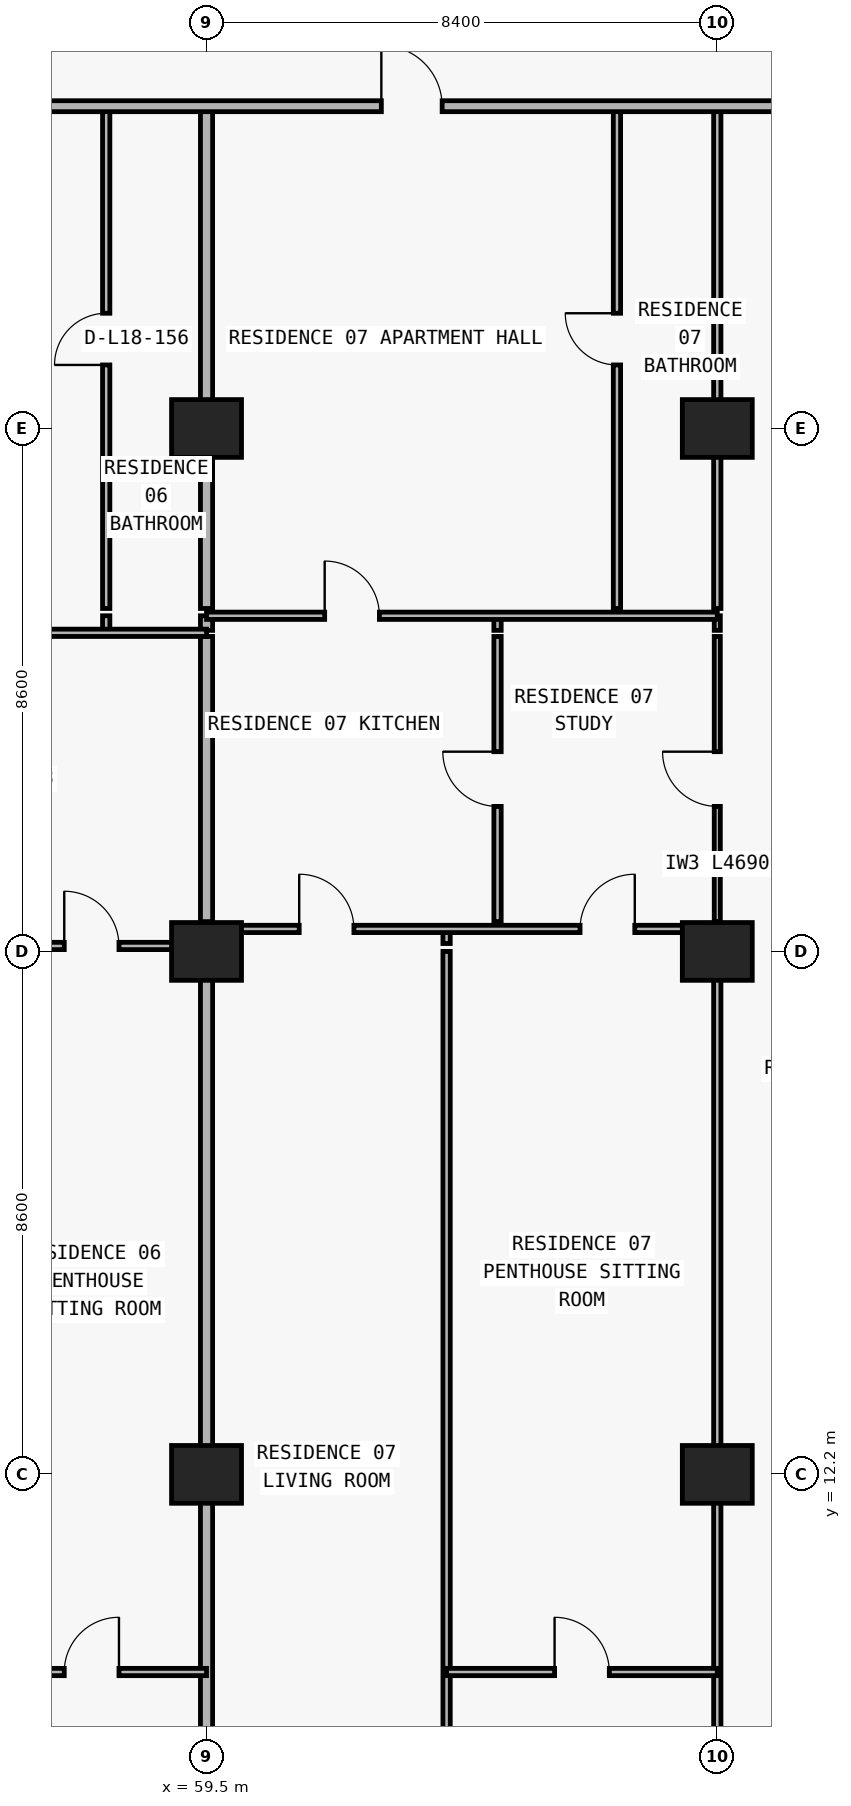
"""IFC4 building model, lengths in metres.
Left out: names, types, materials, properties, quantities, classifications, styles, units other than length and angle.
Written with IfcOpenShell. Run it as: python <this file> out.ifc"""

import sys

from ifc_helpers import new_model, si_unit, direction, frame, frame_2d, origin, origin_2d, place, context, subcontext, project, spatial, rectangle, extrude, element, fill, save


model = new_model("IFC4")
c1 = context("Model", 3, precision=1e-05, world=origin(), true_north=direction((0.0, 1.0)))
c2 = subcontext(c1, "Body", "Model", "MODEL_VIEW")
j1 = project(units=[si_unit("LENGTHUNIT", "METRE"), si_unit("PLANEANGLEUNIT", "RADIAN")], contexts=[c1])
p1 = place(None, origin())
s1 = spatial("IfcSite", under=j1, at=p1, CompositionType="ELEMENT")
p2 = place(p1, origin())
s2 = spatial("IfcBuilding", under=s1, at=p2, CompositionType="ELEMENT")
p3 = place(p2, frame((0.0, 0.0, 69.6)))
s3 = spatial("IfcBuildingStorey", under=s2, at=p3, CompositionType="ELEMENT", Elevation=69.6)
for number, where, z_axis, x_axis in (
    (1, (59.5, 12.2, 0.0), (0.0, 0.0, 1.0), (1.0, 0.0, 0.0)),
    (2, (67.9, 12.2, 0.0), (0.0, 0.0, 1.0), (1.0, 0.0, 0.0)),
    (3, (59.5, 20.8, 0.0), (0.0, 0.0, 1.0), (1.0, 0.0, 0.0)),
    (4, (67.9, 20.8, 0.0), (0.0, 0.0, 1.0), (1.0, 0.0, 0.0)),
    (5, (59.5, 29.4, 0.0), (0.0, 0.0, 1.0), (1.0, 0.0, 0.0)),
    (6, (67.9, 29.4, 0.0), (0.0, 0.0, 1.0), (1.0, 0.0, 0.0)),
):
    element("IfcColumn", number, at=place(p3, frame(where, z_axis=z_axis, x_axis=x_axis)), inside=s3, PredefinedType="COLUMN", context=c2, shape_type="SweptSolid", body=[
        extrude(rectangle(XDim=1.15, YDim=0.95, at=origin_2d()), origin(), (0.0, 0.0, 1.0), 3.05),
    ])
p4 = place(p3, frame((57.85, 26.08, 0.0), z_axis=(0.0, 0.0, 1.0), x_axis=(0.0, 1.0, 0.0)))
e7 = element("IfcWall", 7, at=p4, inside=s3, PredefinedType="PARTITIONING", context=c2, shape_type="SweptSolid", body=[
    extrude(rectangle(XDim=0.24, YDim=0.12, at=frame_2d((0.12, 0.0))), origin(), (0.0, 0.0, 1.0), 3.05),
])
p5 = place(p3, frame((57.85, 26.44, 0.0), z_axis=(0.0, 0.0, 1.0), x_axis=(0.0, 1.0, 0.0)))
e8 = element("IfcWall", 8, at=p5, inside=s3, PredefinedType="PARTITIONING", context=c2, shape_type="SweptSolid", body=[
    extrude(rectangle(XDim=8.26, YDim=0.12, at=frame_2d((4.13, 0.0))), origin(), (0.0, 0.0, 1.0), 3.05),
])
p6 = place(p5, frame((4.005, 0.0, 0.0)))
e9 = element("IfcOpeningElement", 9, at=p6, cuts=e8, PredefinedType="OPENING", context=c2, shape_type="SweptSolid", body=[
    extrude(rectangle(XDim=0.85, YDim=2.1, at=frame_2d((0.425, 1.05))), frame((0.0, 0.07, 0.0), z_axis=(0.0, -1.0, 0.0), x_axis=(1.0, 0.0, 0.0)), (0.0, 0.0, 1.0), 0.14),
])
p7 = place(p3, frame((59.5, 6.24, 0.0), z_axis=(0.0, 0.0, 1.0), x_axis=(0.0, 1.0, 0.0)))
e10 = element("IfcWall", 10, at=p7, inside=s3, PredefinedType="PARTITIONING", context=c2, shape_type="SweptSolid", body=[
    extrude(rectangle(XDim=14.56, YDim=0.2, at=frame_2d((7.28, 0.0))), origin(), (0.0, 0.0, 1.0), 2.11),
])
p8 = place(p3, frame((59.5, 20.93, 0.0), z_axis=(0.0, 0.0, 1.0), x_axis=(0.0, 1.0, 0.0)))
e11 = element("IfcWall", 11, at=p8, inside=s3, PredefinedType="PARTITIONING", context=c2, shape_type="SweptSolid", body=[
    extrude(rectangle(XDim=0.24, YDim=0.2, at=frame_2d((0.12, 0.0))), origin(), (0.0, 0.0, 1.0), 3.05),
])
p9 = place(p3, frame((59.5, 21.29, 0.0), z_axis=(0.0, 0.0, 1.0), x_axis=(0.0, 1.0, 0.0)))
e12 = element("IfcWall", 12, at=p9, inside=s3, PredefinedType="PARTITIONING", context=c2, shape_type="SweptSolid", body=[
    extrude(rectangle(XDim=4.69, YDim=0.2, at=frame_2d((2.345, 0.0))), origin(), (0.0, 0.0, 1.0), 2.11),
])
p10 = place(p3, frame((59.5, 26.08, 0.0), z_axis=(0.0, 0.0, 1.0), x_axis=(0.0, 1.0, 0.0)))
e13 = element("IfcWall", 13, at=p10, inside=s3, PredefinedType="PARTITIONING", context=c2, shape_type="SweptSolid", body=[
    extrude(rectangle(XDim=0.24, YDim=0.2, at=frame_2d((0.12, 0.0))), origin(), (0.0, 0.0, 1.0), 2.11),
])
p11 = place(p3, frame((59.5, 26.44, 0.0), z_axis=(0.0, 0.0, 1.0), x_axis=(0.0, 1.0, 0.0)))
e14 = element("IfcWall", 14, at=p11, inside=s3, PredefinedType="PARTITIONING", context=c2, shape_type="SweptSolid", body=[
    extrude(rectangle(XDim=8.26, YDim=0.2, at=frame_2d((4.13, 0.0))), origin(), (0.0, 0.0, 1.0), 2.11),
])
p12 = place(p3, frame((63.448, 6.24, 0.0), z_axis=(0.0, 0.0, 1.0), x_axis=(0.0, 1.0, 0.0)))
e15 = element("IfcWall", 15, at=p12, inside=s3, PredefinedType="PARTITIONING", context=c2, shape_type="SweptSolid", body=[
    extrude(rectangle(XDim=14.56, YDim=0.12, at=frame_2d((7.28, 0.0))), origin(), (0.0, 0.0, 1.0), 3.05),
])
p13 = place(p3, frame((63.448, 20.93, 0.0), z_axis=(0.0, 0.0, 1.0), x_axis=(0.0, 1.0, 0.0)))
e16 = element("IfcWall", 16, at=p13, inside=s3, PredefinedType="PARTITIONING", context=c2, shape_type="SweptSolid", body=[
    extrude(rectangle(XDim=0.24, YDim=0.12, at=frame_2d((0.12, 0.0))), origin(), (0.0, 0.0, 1.0), 3.05),
])
p14 = place(p3, frame((64.286, 21.29, 0.0), z_axis=(0.0, 0.0, 1.0), x_axis=(0.0, 1.0, 0.0)))
e17 = element("IfcWall", 17, at=p14, inside=s3, PredefinedType="PARTITIONING", context=c2, shape_type="SweptSolid", body=[
    extrude(rectangle(XDim=4.69, YDim=0.12, at=frame_2d((2.345, 0.0))), origin(), (0.0, 0.0, 1.0), 3.05),
])
p15 = place(p14, frame((1.895, 0.0, 0.0)))
e18 = element("IfcOpeningElement", 18, at=p15, cuts=e17, PredefinedType="OPENING", context=c2, shape_type="SweptSolid", body=[
    extrude(rectangle(XDim=0.9, YDim=2.15, at=frame_2d((0.45, 1.075))), frame((0.0, 0.07, 0.0), z_axis=(0.0, -1.0, 0.0), x_axis=(1.0, 0.0, 0.0)), (0.0, 0.0, 1.0), 0.14),
])
p16 = place(p3, frame((64.286, 26.08, 0.0), z_axis=(0.0, 0.0, 1.0), x_axis=(0.0, 1.0, 0.0)))
e19 = element("IfcWall", 19, at=p16, inside=s3, PredefinedType="PARTITIONING", context=c2, shape_type="SweptSolid", body=[
    extrude(rectangle(XDim=0.24, YDim=0.12, at=frame_2d((0.12, 0.0))), origin(), (0.0, 0.0, 1.0), 3.05),
])
p17 = place(p3, frame((66.25, 26.44, 0.0), z_axis=(0.0, 0.0, 1.0), x_axis=(0.0, 1.0, 0.0)))
e20 = element("IfcWall", 20, at=p17, inside=s3, PredefinedType="PARTITIONING", context=c2, shape_type="SweptSolid", body=[
    extrude(rectangle(XDim=8.26, YDim=0.12, at=frame_2d((4.13, 0.0))), origin(), (0.0, 0.0, 1.0), 3.05),
])
p18 = place(p17, frame((4.005, 0.0, 0.0)))
e21 = element("IfcOpeningElement", 21, at=p18, cuts=e20, PredefinedType="OPENING", context=c2, shape_type="SweptSolid", body=[
    extrude(rectangle(XDim=0.85, YDim=2.1, at=frame_2d((0.425, 1.05))), frame((0.0, 0.07, 0.0), z_axis=(0.0, -1.0, 0.0), x_axis=(1.0, 0.0, 0.0)), (0.0, 0.0, 1.0), 0.14),
])
p19 = place(p3, frame((67.9, 6.24, 0.0), z_axis=(0.0, 0.0, 1.0), x_axis=(0.0, 1.0, 0.0)))
e22 = element("IfcWall", 22, at=p19, inside=s3, PredefinedType="PARTITIONING", context=c2, shape_type="SweptSolid", body=[
    extrude(rectangle(XDim=14.56, YDim=0.12, at=frame_2d((7.28, 0.0))), origin(), (0.0, 0.0, 1.0), 2.11),
])
p20 = place(p3, frame((67.9, 20.93, 0.0), z_axis=(0.0, 0.0, 1.0), x_axis=(0.0, 1.0, 0.0)))
e23 = element("IfcWall", 23, at=p20, inside=s3, PredefinedType="PARTITIONING", context=c2, shape_type="SweptSolid", body=[
    extrude(rectangle(XDim=0.24, YDim=0.12, at=frame_2d((0.12, 0.0))), origin(), (0.0, 0.0, 1.0), 3.05),
])
p21 = place(p3, frame((67.9, 21.29, 0.0), z_axis=(0.0, 0.0, 1.0), x_axis=(0.0, 1.0, 0.0)))
e24 = element("IfcWall", 24, at=p21, inside=s3, PredefinedType="MOVABLE", context=c2, shape_type="SweptSolid", body=[
    extrude(rectangle(XDim=4.69, YDim=0.1, at=frame_2d((2.345, 0.0))), origin(), (0.0, 0.0, 1.0), 2.11),
])
p22 = place(p21, frame((1.895, 0.0, 0.0)))
e25 = element("IfcOpeningElement", 25, at=p22, cuts=e24, PredefinedType="OPENING", context=c2, shape_type="SweptSolid", body=[
    extrude(rectangle(XDim=0.9, YDim=2.06, at=frame_2d((0.45, 1.03))), frame((0.0, 0.06, 0.0), z_axis=(0.0, -1.0, 0.0), x_axis=(1.0, 0.0, 0.0)), (0.0, 0.0, 1.0), 0.12),
])
p23 = place(p3, frame((67.9, 26.08, 0.0), z_axis=(0.0, 0.0, 1.0), x_axis=(0.0, 1.0, 0.0)))
e26 = element("IfcWall", 26, at=p23, inside=s3, PredefinedType="MOVABLE", context=c2, shape_type="SweptSolid", body=[
    extrude(rectangle(XDim=0.24, YDim=0.1, at=frame_2d((0.12, 0.0))), origin(), (0.0, 0.0, 1.0), 2.11),
])
p24 = place(p3, frame((67.9, 26.44, 0.0), z_axis=(0.0, 0.0, 1.0), x_axis=(0.0, 1.0, 0.0)))
e27 = element("IfcWall", 27, at=p24, inside=s3, PredefinedType="PARTITIONING", context=c2, shape_type="SweptSolid", body=[
    extrude(rectangle(XDim=8.26, YDim=0.12, at=frame_2d((4.13, 0.0))), origin(), (0.0, 0.0, 1.0), 2.11),
])
p25 = place(p3, frame((55.72, 8.95, 0.0), z_axis=(0.0, 0.0, 1.0), x_axis=(1.0, 0.0, 0.0)))
e28 = element("IfcWall", 28, at=p25, inside=s3, PredefinedType="PARTITIONING", context=c2, shape_type="SweptSolid", body=[
    extrude(rectangle(XDim=3.78, YDim=0.12, at=frame_2d((1.89, 0.0))), origin(), (0.0, 0.0, 1.0), 3.05),
])
p26 = place(p25, frame((1.44, 0.0, 0.0)))
e29 = element("IfcOpeningElement", 29, at=p26, cuts=e28, PredefinedType="OPENING", context=c2, shape_type="SweptSolid", body=[
    extrude(rectangle(XDim=0.9, YDim=2.15, at=frame_2d((0.45, 1.075))), frame((0.0, 0.07, 0.0), z_axis=(0.0, -1.0, 0.0), x_axis=(1.0, 0.0, 0.0)), (0.0, 0.0, 1.0), 0.14),
])
p27 = place(p3, frame((63.448, 8.95, 0.0), z_axis=(0.0, 0.0, 1.0), x_axis=(1.0, 0.0, 0.0)))
e30 = element("IfcWall", 30, at=p27, inside=s3, PredefinedType="PARTITIONING", context=c2, shape_type="SweptSolid", body=[
    extrude(rectangle(XDim=4.452, YDim=0.12, at=frame_2d((2.226, 0.0))), origin(), (0.0, 0.0, 1.0), 3.05),
])
p28 = place(p27, frame((1.776, 0.0, 0.0)))
e31 = element("IfcOpeningElement", 31, at=p28, cuts=e30, PredefinedType="OPENING", context=c2, shape_type="SweptSolid", body=[
    extrude(rectangle(XDim=0.9, YDim=2.15, at=frame_2d((0.45, 1.075))), frame((0.0, 0.07, 0.0), z_axis=(0.0, -1.0, 0.0), x_axis=(1.0, 0.0, 0.0)), (0.0, 0.0, 1.0), 0.14),
])
p29 = place(p3, frame((51.37, 20.89, 0.0), z_axis=(0.0, 0.0, 1.0), x_axis=(1.0, 0.0, 0.0)))
e32 = element("IfcWall", 32, at=p29, inside=s3, PredefinedType="PARTITIONING", context=c2, shape_type="SweptSolid", body=[
    extrude(rectangle(XDim=8.13, YDim=0.12, at=frame_2d((4.065, 0.0))), origin(), (0.0, 0.0, 1.0), 2.11),
])
p30 = place(p29, frame((1.683, 0.0, 0.0)))
e33 = element("IfcOpeningElement", 33, at=p30, cuts=e32, PredefinedType="OPENING", context=c2, shape_type="SweptSolid", body=[
    extrude(rectangle(XDim=0.9, YDim=2.06, at=frame_2d((0.45, 1.03))), frame((0.0, 0.07, 0.0), z_axis=(0.0, -1.0, 0.0), x_axis=(1.0, 0.0, 0.0)), (0.0, 0.0, 1.0), 0.14),
])
p31 = place(p29, frame((5.79, 0.0, 0.0)))
e34 = element("IfcOpeningElement", 34, at=p31, cuts=e32, PredefinedType="OPENING", context=c2, shape_type="SweptSolid", body=[
    extrude(rectangle(XDim=0.9, YDim=2.06, at=frame_2d((0.45, 1.03))), frame((0.0, 0.07, 0.0), z_axis=(0.0, -1.0, 0.0), x_axis=(1.0, 0.0, 0.0)), (0.0, 0.0, 1.0), 0.14),
])
p32 = place(p3, frame((59.5, 21.17, 0.0), z_axis=(0.0, 0.0, 1.0), x_axis=(1.0, 0.0, 0.0)))
e35 = element("IfcWall", 35, at=p32, inside=s3, PredefinedType="PARTITIONING", context=c2, shape_type="SweptSolid", body=[
    extrude(rectangle(XDim=8.4, YDim=0.12, at=frame_2d((4.2, 0.0))), origin(), (0.0, 0.0, 1.0), 3.05),
])
p33 = place(p32, frame((1.524, 0.0, 0.0)))
e36 = element("IfcOpeningElement", 36, at=p33, cuts=e35, PredefinedType="OPENING", context=c2, shape_type="SweptSolid", body=[
    extrude(rectangle(XDim=0.9, YDim=2.15, at=frame_2d((0.45, 1.075))), frame((0.0, 0.07, 0.0), z_axis=(0.0, -1.0, 0.0), x_axis=(1.0, 0.0, 0.0)), (0.0, 0.0, 1.0), 0.14),
])
p34 = place(p32, frame((6.143, 0.0, 0.0)))
e37 = element("IfcOpeningElement", 37, at=p34, cuts=e35, PredefinedType="OPENING", context=c2, shape_type="SweptSolid", body=[
    extrude(rectangle(XDim=0.9, YDim=2.15, at=frame_2d((0.45, 1.075))), frame((0.0, 0.07, 0.0), z_axis=(0.0, -1.0, 0.0), x_axis=(1.0, 0.0, 0.0)), (0.0, 0.0, 1.0), 0.14),
])
p35 = place(p3, frame((51.37, 26.04, 0.0), z_axis=(0.0, 0.0, 1.0), x_axis=(1.0, 0.0, 0.0)))
e38 = element("IfcWall", 38, at=p35, inside=s3, PredefinedType="PARTITIONING", context=c2, shape_type="SweptSolid", body=[
    extrude(rectangle(XDim=8.13, YDim=0.12, at=frame_2d((4.065, 0.0))), origin(), (0.0, 0.0, 1.0), 3.05),
])
p36 = place(p35, frame((1.683, 0.0, 0.0)))
e39 = element("IfcOpeningElement", 39, at=p36, cuts=e38, PredefinedType="OPENING", context=c2, shape_type="SweptSolid", body=[
    extrude(rectangle(XDim=0.9, YDim=2.15, at=frame_2d((0.45, 1.075))), frame((0.0, 0.07, 0.0), z_axis=(0.0, -1.0, 0.0), x_axis=(1.0, 0.0, 0.0)), (0.0, 0.0, 1.0), 0.14),
])
p37 = place(p3, frame((59.5, 26.32, 0.0), z_axis=(0.0, 0.0, 1.0), x_axis=(1.0, 0.0, 0.0)))
e40 = element("IfcWall", 40, at=p37, inside=s3, PredefinedType="PARTITIONING", context=c2, shape_type="SweptSolid", body=[
    extrude(rectangle(XDim=8.4, YDim=0.12, at=frame_2d((4.2, 0.0))), origin(), (0.0, 0.0, 1.0), 3.05),
])
p38 = place(p37, frame((1.943, 0.0, 0.0)))
e41 = element("IfcOpeningElement", 41, at=p38, cuts=e40, PredefinedType="OPENING", context=c2, shape_type="SweptSolid", body=[
    extrude(rectangle(XDim=0.9, YDim=2.15, at=frame_2d((0.45, 1.075))), frame((0.0, 0.07, 0.0), z_axis=(0.0, -1.0, 0.0), x_axis=(1.0, 0.0, 0.0)), (0.0, 0.0, 1.0), 0.14),
])
p39 = place(p3, frame((5.105, 34.7, 0.0), z_axis=(0.0, 0.0, 1.0), x_axis=(1.0, 0.0, 0.0)))
e42 = element("IfcWall", 42, at=p39, inside=s3, PredefinedType="PARTITIONING", context=c2, shape_type="SweptSolid", body=[
    extrude(rectangle(XDim=67.595, YDim=0.18, at=frame_2d((33.797, 0.0))), origin(), (0.0, 0.0, 1.0), 3.05),
])
p40 = place(p39, frame((7.67, 0.0, 0.0)))
e43 = element("IfcOpeningElement", 43, at=p40, cuts=e42, PredefinedType="OPENING", context=c2, shape_type="SweptSolid", body=[
    extrude(rectangle(XDim=1.0, YDim=2.2, at=frame_2d((0.5, 1.1))), frame((0.0, 0.1, 0.0), z_axis=(0.0, -1.0, 0.0), x_axis=(1.0, 0.0, 0.0)), (0.0, 0.0, 1.0), 0.2),
])
p41 = place(p39, frame((16.07, 0.0, 0.0)))
e44 = element("IfcOpeningElement", 44, at=p41, cuts=e42, PredefinedType="OPENING", context=c2, shape_type="SweptSolid", body=[
    extrude(rectangle(XDim=1.0, YDim=2.2, at=frame_2d((0.5, 1.1))), frame((0.0, 0.1, 0.0), z_axis=(0.0, -1.0, 0.0), x_axis=(1.0, 0.0, 0.0)), (0.0, 0.0, 1.0), 0.2),
])
p42 = place(p39, frame((24.47, 0.0, 0.0)))
e45 = element("IfcOpeningElement", 45, at=p42, cuts=e42, PredefinedType="OPENING", context=c2, shape_type="SweptSolid", body=[
    extrude(rectangle(XDim=1.0, YDim=2.2, at=frame_2d((0.5, 1.1))), frame((0.0, 0.1, 0.0), z_axis=(0.0, -1.0, 0.0), x_axis=(1.0, 0.0, 0.0)), (0.0, 0.0, 1.0), 0.2),
])
p43 = place(p39, frame((32.47, 0.0, 0.0)))
e46 = element("IfcOpeningElement", 46, at=p43, cuts=e42, PredefinedType="OPENING", context=c2, shape_type="SweptSolid", body=[
    extrude(rectangle(XDim=1.0, YDim=2.2, at=frame_2d((0.5, 1.1))), frame((0.0, 0.1, 0.0), z_axis=(0.0, -1.0, 0.0), x_axis=(1.0, 0.0, 0.0)), (0.0, 0.0, 1.0), 0.2),
])
p44 = place(p39, frame((40.47, 0.0, 0.0)))
e47 = element("IfcOpeningElement", 47, at=p44, cuts=e42, PredefinedType="OPENING", context=c2, shape_type="SweptSolid", body=[
    extrude(rectangle(XDim=1.0, YDim=2.2, at=frame_2d((0.5, 1.1))), frame((0.0, 0.1, 0.0), z_axis=(0.0, -1.0, 0.0), x_axis=(1.0, 0.0, 0.0)), (0.0, 0.0, 1.0), 0.2),
])
p45 = place(p39, frame((48.87, 0.0, 0.0)))
e48 = element("IfcOpeningElement", 48, at=p45, cuts=e42, PredefinedType="OPENING", context=c2, shape_type="SweptSolid", body=[
    extrude(rectangle(XDim=1.0, YDim=2.2, at=frame_2d((0.5, 1.1))), frame((0.0, 0.1, 0.0), z_axis=(0.0, -1.0, 0.0), x_axis=(1.0, 0.0, 0.0)), (0.0, 0.0, 1.0), 0.2),
])
p46 = place(p39, frame((57.27, 0.0, 0.0)))
e49 = element("IfcOpeningElement", 49, at=p46, cuts=e42, PredefinedType="OPENING", context=c2, shape_type="SweptSolid", body=[
    extrude(rectangle(XDim=1.0, YDim=2.2, at=frame_2d((0.5, 1.1))), frame((0.0, 0.1, 0.0), z_axis=(0.0, -1.0, 0.0), x_axis=(1.0, 0.0, 0.0)), (0.0, 0.0, 1.0), 0.2),
])
p47 = place(p6, origin())
e50 = element("IfcDoor", 50, at=p47, inside=s3, OperationType="SINGLE_SWING_LEFT", PredefinedType="DOOR", context=c2, shape_type="SweptSolid", body=[
    extrude(rectangle(XDim=0.85, YDim=2.1, at=frame_2d((0.425, 1.05))), frame((0.0, 0.025, 0.0), z_axis=(0.0, -1.0, 0.0), x_axis=(1.0, 0.0, 0.0)), (0.0, 0.0, 1.0), 0.05),
])
fill(e9, e50)
p48 = place(p31, origin())
e51 = element("IfcDoor", 51, at=p48, inside=s3, OperationType="SINGLE_SWING_LEFT", PredefinedType="DOOR", context=c2, shape_type="SweptSolid", body=[
    extrude(rectangle(XDim=0.9, YDim=2.06, at=frame_2d((0.45, 1.03))), frame((0.0, 0.025, 0.0), z_axis=(0.0, -1.0, 0.0), x_axis=(1.0, 0.0, 0.0)), (0.0, 0.0, 1.0), 0.05),
])
fill(e34, e51)
p49 = place(p26, origin())
e52 = element("IfcDoor", 52, at=p49, inside=s3, OperationType="SINGLE_SWING_RIGHT", PredefinedType="DOOR", context=c2, shape_type="SweptSolid", body=[
    extrude(rectangle(XDim=0.9, YDim=2.15, at=frame_2d((0.45, 1.075))), frame((0.0, 0.025, 0.0), z_axis=(0.0, -1.0, 0.0), x_axis=(1.0, 0.0, 0.0)), (0.0, 0.0, 1.0), 0.05),
])
fill(e29, e52)
p50 = place(p46, origin())
e53 = element("IfcDoor", 53, at=p50, inside=s3, OperationType="SINGLE_SWING_LEFT", PredefinedType="DOOR", context=c2, shape_type="SweptSolid", body=[
    extrude(rectangle(XDim=1.0, YDim=2.2, at=frame_2d((0.5, 1.1))), frame((0.0, 0.025, 0.0), z_axis=(0.0, -1.0, 0.0), x_axis=(1.0, 0.0, 0.0)), (0.0, 0.0, 1.0), 0.05),
])
fill(e49, e53)
p51 = place(p18, origin())
e54 = element("IfcDoor", 54, at=p51, inside=s3, OperationType="SINGLE_SWING_RIGHT", PredefinedType="DOOR", context=c2, shape_type="SweptSolid", body=[
    extrude(rectangle(XDim=0.85, YDim=2.1, at=frame_2d((0.425, 1.05))), frame((0.0, 0.025, 0.0), z_axis=(0.0, -1.0, 0.0), x_axis=(1.0, 0.0, 0.0)), (0.0, 0.0, 1.0), 0.05),
])
fill(e21, e54)
p52 = place(p38, origin())
e55 = element("IfcDoor", 55, at=p52, inside=s3, OperationType="SINGLE_SWING_LEFT", PredefinedType="DOOR", context=c2, shape_type="SweptSolid", body=[
    extrude(rectangle(XDim=0.9, YDim=2.15, at=frame_2d((0.45, 1.075))), frame((0.0, 0.025, 0.0), z_axis=(0.0, -1.0, 0.0), x_axis=(1.0, 0.0, 0.0)), (0.0, 0.0, 1.0), 0.05),
])
fill(e41, e55)
p53 = place(p15, origin())
e56 = element("IfcDoor", 56, at=p53, inside=s3, OperationType="SINGLE_SWING_RIGHT", PredefinedType="DOOR", context=c2, shape_type="SweptSolid", body=[
    extrude(rectangle(XDim=0.9, YDim=2.15, at=frame_2d((0.45, 1.075))), frame((0.0, 0.025, 0.0), z_axis=(0.0, -1.0, 0.0), x_axis=(1.0, 0.0, 0.0)), (0.0, 0.0, 1.0), 0.05),
])
fill(e18, e56)
p54 = place(p33, origin())
e57 = element("IfcDoor", 57, at=p54, inside=s3, OperationType="SINGLE_SWING_LEFT", PredefinedType="DOOR", context=c2, shape_type="SweptSolid", body=[
    extrude(rectangle(XDim=0.9, YDim=2.15, at=frame_2d((0.45, 1.075))), frame((0.0, 0.025, 0.0), z_axis=(0.0, -1.0, 0.0), x_axis=(1.0, 0.0, 0.0)), (0.0, 0.0, 1.0), 0.05),
])
fill(e36, e57)
p55 = place(p34, origin())
e58 = element("IfcDoor", 58, at=p55, inside=s3, OperationType="SINGLE_SWING_RIGHT", PredefinedType="DOOR", context=c2, shape_type="SweptSolid", body=[
    extrude(rectangle(XDim=0.9, YDim=2.15, at=frame_2d((0.45, 1.075))), frame((0.0, 0.025, 0.0), z_axis=(0.0, -1.0, 0.0), x_axis=(1.0, 0.0, 0.0)), (0.0, 0.0, 1.0), 0.05),
])
fill(e37, e58)
p56 = place(p28, origin())
e59 = element("IfcDoor", 59, at=p56, inside=s3, OperationType="SINGLE_SWING_LEFT", PredefinedType="DOOR", context=c2, shape_type="SweptSolid", body=[
    extrude(rectangle(XDim=0.9, YDim=2.15, at=frame_2d((0.45, 1.075))), frame((0.0, 0.025, 0.0), z_axis=(0.0, -1.0, 0.0), x_axis=(1.0, 0.0, 0.0)), (0.0, 0.0, 1.0), 0.05),
])
fill(e31, e59)
p57 = place(p22, origin())
e60 = element("IfcDoor", 60, at=p57, inside=s3, OperationType="SINGLE_SWING_RIGHT", PredefinedType="DOOR", context=c2, shape_type="SweptSolid", body=[
    extrude(rectangle(XDim=0.9, YDim=2.06, at=frame_2d((0.45, 1.03))), frame((0.0, 0.025, 0.0), z_axis=(0.0, -1.0, 0.0), x_axis=(1.0, 0.0, 0.0)), (0.0, 0.0, 1.0), 0.05),
])
fill(e25, e60)
save(model, sys.argv[1])
